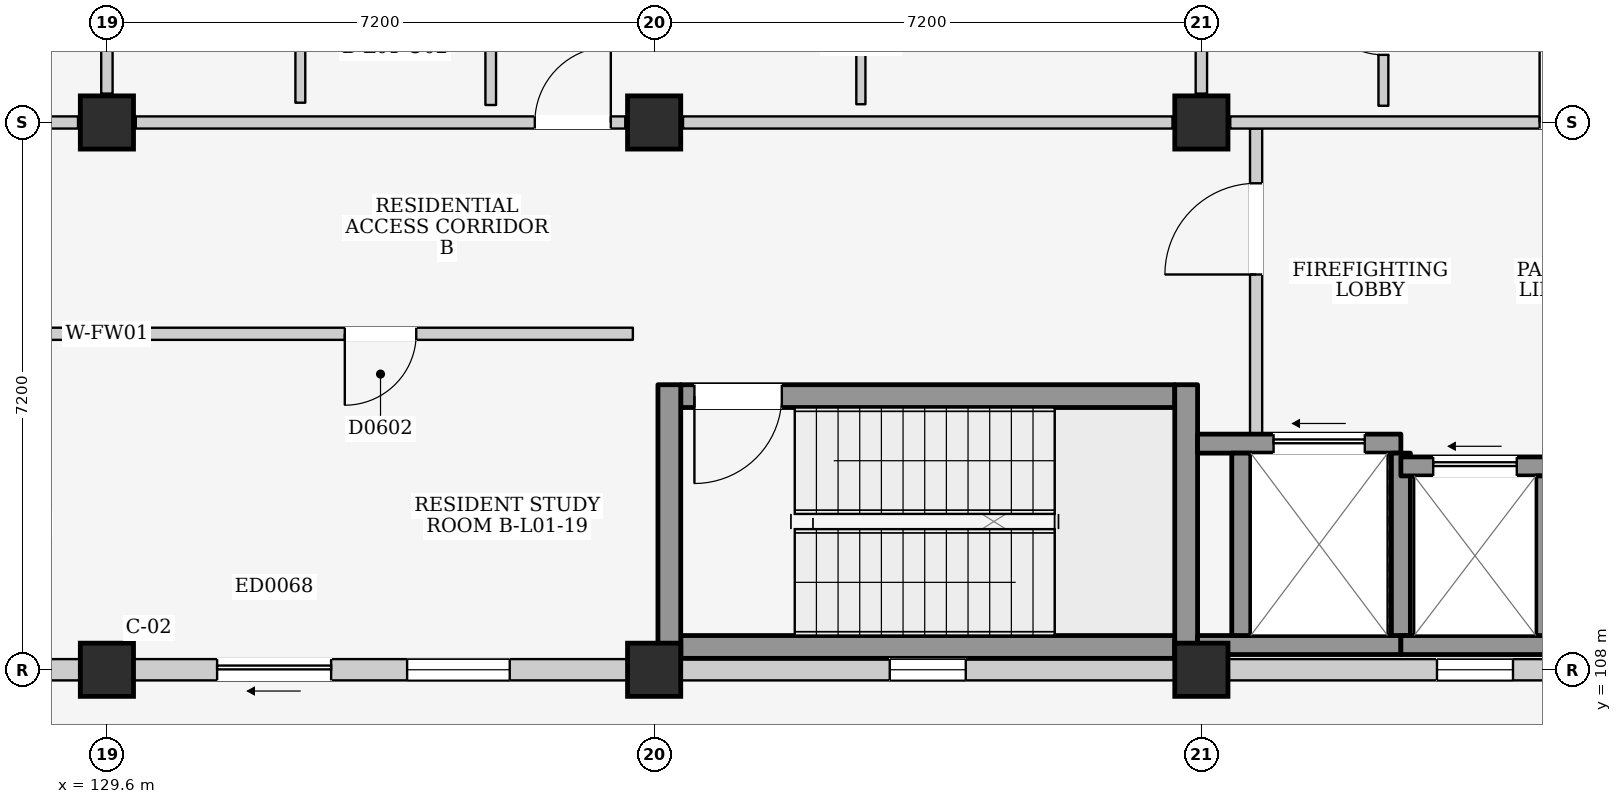
"""IFC4 building model, lengths in metres.
Left out: names, types, materials, properties, quantities, classifications, styles, units other than length and angle.
Written with IfcOpenShell. Run it as: python <this file> out.ifc"""

import sys

from ifc_helpers import new_model, si_unit, direction, frame, frame_2d, origin, origin_2d, place, context, subcontext, project, spatial, rectangle, extrude, element, fill, save


model = new_model("IFC4")
c1 = context("Model", 3, precision=1e-05, world=origin(), true_north=direction((0.0, 1.0)))
c2 = subcontext(c1, "Body", "Model", "MODEL_VIEW")
j1 = project(units=[si_unit("LENGTHUNIT", "METRE"), si_unit("PLANEANGLEUNIT", "RADIAN")], contexts=[c1])
p1 = place(None, origin())
s1 = spatial("IfcSite", under=j1, at=p1, CompositionType="ELEMENT")
p2 = place(p1, origin())
s2 = spatial("IfcBuilding", under=s1, at=p2, CompositionType="ELEMENT")
p3 = place(p2, frame((0.0, 0.0, 4.5)))
s3 = spatial("IfcBuildingStorey", under=s2, at=p3, CompositionType="ELEMENT", Elevation=4.5)
for number, where, z_axis, x_axis in (
    (1, (129.6, 108.0, 0.0), (0.0, 0.0, 1.0), (1.0, 0.0, 0.0)),
    (2, (129.6, 115.2, 0.0), (0.0, 0.0, 1.0), (1.0, 0.0, 0.0)),
    (3, (136.8, 108.0, 0.0), (0.0, 0.0, 1.0), (1.0, 0.0, 0.0)),
    (4, (136.8, 115.2, 0.0), (0.0, 0.0, 1.0), (1.0, 0.0, 0.0)),
    (5, (144.0, 108.0, 0.0), (0.0, 0.0, 1.0), (1.0, 0.0, 0.0)),
    (6, (144.0, 115.2, 0.0), (0.0, 0.0, 1.0), (1.0, 0.0, 0.0)),
):
    element("IfcColumn", number, at=place(p3, frame(where, z_axis=z_axis, x_axis=x_axis)), inside=s3, PredefinedType="COLUMN", context=c2, shape_type="SweptSolid", body=[
        extrude(rectangle(XDim=0.7, YDim=0.7, at=origin_2d()), origin(), (0.0, 0.0, 1.0), 4.5),
    ])
p4 = place(p3, frame((122.75, 108.0, 0.0), z_axis=(0.0, 0.0, 1.0), x_axis=(1.0, 0.0, 0.0)))
e7 = element("IfcWall", 7, at=p4, inside=s3, PredefinedType="ELEMENTEDWALL", context=c2, shape_type="SweptSolid", body=[
    extrude(rectangle(XDim=6.5, YDim=0.28, at=frame_2d((3.25, 0.0))), origin(), (0.0, 0.0, 1.0), 3.635),
])
p5 = place(p4, frame((1.1, 0.0, 0.0)))
e8 = element("IfcOpeningElement", 8, at=p5, cuts=e7, PredefinedType="OPENING", context=c2, shape_type="SweptSolid", body=[
    extrude(rectangle(XDim=1.5, YDim=2.12, at=frame_2d((0.75, 1.06))), frame((0.0, 0.155, 0.0), z_axis=(0.0, -1.0, 0.0), x_axis=(1.0, 0.0, 0.0)), (0.0, 0.0, 1.0), 0.31),
])
p6 = place(p4, frame((3.6, 0.0, 0.95)))
e9 = element("IfcOpeningElement", 9, at=p6, cuts=e7, PredefinedType="OPENING", context=c2, shape_type="SweptSolid", body=[
    extrude(rectangle(XDim=1.35, YDim=1.5, at=frame_2d((0.675, 0.75))), frame((0.0, 0.155, 0.0), z_axis=(0.0, -1.0, 0.0), x_axis=(1.0, 0.0, 0.0)), (0.0, 0.0, 1.0), 0.31),
])
p7 = place(p3, frame((129.95, 108.0, 0.0), z_axis=(0.0, 0.0, 1.0), x_axis=(1.0, 0.0, 0.0)))
e10 = element("IfcWall", 10, at=p7, inside=s3, PredefinedType="ELEMENTEDWALL", context=c2, shape_type="SweptSolid", body=[
    extrude(rectangle(XDim=6.5, YDim=0.28, at=frame_2d((3.25, 0.0))), origin(), (0.0, 0.0, 1.0), 3.635),
])
p8 = place(p7, frame((1.1, 0.0, 0.0)))
e11 = element("IfcOpeningElement", 11, at=p8, cuts=e10, PredefinedType="OPENING", context=c2, shape_type="SweptSolid", body=[
    extrude(rectangle(XDim=1.5, YDim=2.12, at=frame_2d((0.75, 1.06))), frame((0.0, 0.155, 0.0), z_axis=(0.0, -1.0, 0.0), x_axis=(1.0, 0.0, 0.0)), (0.0, 0.0, 1.0), 0.31),
])
p9 = place(p7, frame((3.6, 0.0, 0.95)))
e12 = element("IfcOpeningElement", 12, at=p9, cuts=e10, PredefinedType="OPENING", context=c2, shape_type="SweptSolid", body=[
    extrude(rectangle(XDim=1.35, YDim=1.5, at=frame_2d((0.675, 0.75))), frame((0.0, 0.155, 0.0), z_axis=(0.0, -1.0, 0.0), x_axis=(1.0, 0.0, 0.0)), (0.0, 0.0, 1.0), 0.31),
])
p10 = place(p3, frame((137.15, 108.0, 0.0), z_axis=(0.0, 0.0, 1.0), x_axis=(1.0, 0.0, 0.0)))
e13 = element("IfcWall", 13, at=p10, inside=s3, PredefinedType="ELEMENTEDWALL", context=c2, shape_type="SweptSolid", body=[
    extrude(rectangle(XDim=6.5, YDim=0.28, at=frame_2d((3.25, 0.0))), origin(), (0.0, 0.0, 1.0), 3.635),
])
p11 = place(p10, frame((2.75, 0.0, 1.2)))
e14 = element("IfcOpeningElement", 14, at=p11, cuts=e13, PredefinedType="OPENING", context=c2, shape_type="SweptSolid", body=[
    extrude(rectangle(XDim=1.0, YDim=0.9, at=frame_2d((0.5, 0.45))), frame((0.0, 0.155, 0.0), z_axis=(0.0, -1.0, 0.0), x_axis=(1.0, 0.0, 0.0)), (0.0, 0.0, 1.0), 0.31),
])
p12 = place(p3, frame((144.35, 108.0, 0.0), z_axis=(0.0, 0.0, 1.0), x_axis=(1.0, 0.0, 0.0)))
e15 = element("IfcWall", 15, at=p12, inside=s3, PredefinedType="ELEMENTEDWALL", context=c2, shape_type="SweptSolid", body=[
    extrude(rectangle(XDim=6.5, YDim=0.28, at=frame_2d((3.25, 0.0))), origin(), (0.0, 0.0, 1.0), 3.635),
])
p13 = place(p12, frame((2.75, 0.0, 1.2)))
e16 = element("IfcOpeningElement", 16, at=p13, cuts=e15, PredefinedType="OPENING", context=c2, shape_type="SweptSolid", body=[
    extrude(rectangle(XDim=1.0, YDim=0.9, at=frame_2d((0.5, 0.45))), frame((0.0, 0.155, 0.0), z_axis=(0.0, -1.0, 0.0), x_axis=(1.0, 0.0, 0.0)), (0.0, 0.0, 1.0), 0.31),
])
p14 = place(p3, frame((137.15, 108.3, 0.0), z_axis=(0.0, 0.0, 1.0), x_axis=(1.0, 0.0, 0.0)))
e17 = element("IfcWall", 17, at=p14, inside=s3, PredefinedType="SHEAR", context=c2, shape_type="SweptSolid", body=[
    extrude(rectangle(XDim=6.5, YDim=0.3, at=frame_2d((3.25, 0.0))), origin(), (0.0, 0.0, 1.0), 4.25),
])
p15 = place(p3, frame((137.15, 111.6, 0.0), z_axis=(0.0, 0.0, 1.0), x_axis=(1.0, 0.0, 0.0)))
e18 = element("IfcWall", 18, at=p15, inside=s3, PredefinedType="SHEAR", context=c2, shape_type="SweptSolid", body=[
    extrude(rectangle(XDim=6.5, YDim=0.3, at=frame_2d((3.25, 0.0))), origin(), (0.0, 0.0, 1.0), 4.25),
])
p16 = place(p15, frame((0.18, 0.0, 0.0)))
e19 = element("IfcOpeningElement", 19, at=p16, cuts=e18, PredefinedType="OPENING", context=c2, shape_type="SweptSolid", body=[
    extrude(rectangle(XDim=1.15, YDim=2.2, at=frame_2d((0.575, 1.1))), frame((0.0, 0.165, 0.0), z_axis=(0.0, -1.0, 0.0), x_axis=(1.0, 0.0, 0.0)), (0.0, 0.0, 1.0), 0.33),
])
for number, where, z_axis, x_axis in (
    (20, (137.0, 108.15, 0.0), (0.0, 0.0, 1.0), (0.0, 1.0, 0.0)),
    (21, (143.8, 108.15, 0.0), (0.0, 0.0, 1.0), (0.0, 1.0, 0.0)),
):
    element("IfcWall", number, at=place(p3, frame(where, z_axis=z_axis, x_axis=x_axis)), inside=s3, PredefinedType="SHEAR", context=c2, shape_type="SweptSolid", body=[
        extrude(rectangle(XDim=3.6, YDim=0.3, at=frame_2d((1.8, 0.0))), origin(), (0.0, 0.0, 1.0), 4.25),
    ])
p17 = place(p3, frame((144.72, 111.1, 0.0), z_axis=(0.0, 0.0, 1.0), x_axis=(0.0, 1.0, 0.0)))
e22 = element("IfcWall", 22, at=p17, inside=s3, PredefinedType="PARTITIONING", context=c2, shape_type="SweptSolid", body=[
    extrude(rectangle(XDim=4.02, YDim=0.16, at=frame_2d((2.01, 0.0))), origin(), (0.0, 0.0, 1.0), 4.25),
])
p18 = place(p17, frame((2.1, 0.0, 0.0)))
e23 = element("IfcOpeningElement", 23, at=p18, cuts=e22, PredefinedType="OPENING", context=c2, shape_type="SweptSolid", body=[
    extrude(rectangle(XDim=1.2, YDim=2.2, at=frame_2d((0.6, 1.1))), frame((0.0, 0.095, 0.0), z_axis=(0.0, -1.0, 0.0), x_axis=(1.0, 0.0, 0.0)), (0.0, 0.0, 1.0), 0.19),
])
p19 = place(p3, frame((143.95, 108.325, 0.0), z_axis=(0.0, 0.0, 1.0), x_axis=(1.0, 0.0, 0.0)))
e24 = element("IfcWall", 24, at=p19, inside=s3, PredefinedType="SHEAR", context=c2, shape_type="SweptSolid", body=[
    extrude(rectangle(XDim=2.675, YDim=0.25, at=frame_2d((1.337, 0.0))), origin(), (0.0, 0.0, 1.0), 4.25),
])
p20 = place(p3, frame((143.95, 110.975, 0.0), z_axis=(0.0, 0.0, 1.0), x_axis=(1.0, 0.0, 0.0)))
e25 = element("IfcWall", 25, at=p20, inside=s3, PredefinedType="SHEAR", context=c2, shape_type="SweptSolid", body=[
    extrude(rectangle(XDim=2.675, YDim=0.25, at=frame_2d((1.337, 0.0))), origin(), (0.0, 0.0, 1.0), 4.25),
])
p21 = place(p20, frame((1.0, 0.0, 0.0)))
e26 = element("IfcOpeningElement", 26, at=p21, cuts=e25, PredefinedType="OPENING", context=c2, shape_type="SweptSolid", body=[
    extrude(rectangle(XDim=1.2, YDim=2.25, at=frame_2d((0.6, 1.125))), frame((0.0, 0.14, 0.0), z_axis=(0.0, -1.0, 0.0), x_axis=(1.0, 0.0, 0.0)), (0.0, 0.0, 1.0), 0.28),
])
for number, where, z_axis, x_axis in (
    (27, (144.525, 108.45, 0.0), (0.0, 0.0, 1.0), (0.0, 1.0, 0.0)),
    (28, (146.625, 108.45, 0.0), (0.0, 0.0, 1.0), (0.0, 1.0, 0.0)),
):
    element("IfcWall", number, at=place(p3, frame(where, z_axis=z_axis, x_axis=x_axis)), inside=s3, PredefinedType="SHEAR", context=c2, shape_type="SweptSolid", body=[
        extrude(rectangle(XDim=2.4, YDim=0.25, at=frame_2d((1.2, 0.0))), origin(), (0.0, 0.0, 1.0), 4.25),
    ])
p22 = place(p3, frame((146.625, 108.325, 0.0), z_axis=(0.0, 0.0, 1.0), x_axis=(1.0, 0.0, 0.0)))
e29 = element("IfcWall", 29, at=p22, inside=s3, PredefinedType="SHEAR", context=c2, shape_type="SweptSolid", body=[
    extrude(rectangle(XDim=2.025, YDim=0.25, at=frame_2d((1.012, 0.0))), origin(), (0.0, 0.0, 1.0), 4.25),
])
p23 = place(p3, frame((146.625, 110.675, 0.0), z_axis=(0.0, 0.0, 1.0), x_axis=(1.0, 0.0, 0.0)))
e30 = element("IfcWall", 30, at=p23, inside=s3, PredefinedType="SHEAR", context=c2, shape_type="SweptSolid", body=[
    extrude(rectangle(XDim=2.025, YDim=0.25, at=frame_2d((1.012, 0.0))), origin(), (0.0, 0.0, 1.0), 4.25),
])
p24 = place(p23, frame((0.425, 0.0, 0.0)))
e31 = element("IfcOpeningElement", 31, at=p24, cuts=e30, PredefinedType="OPENING", context=c2, shape_type="SweptSolid", body=[
    extrude(rectangle(XDim=1.1, YDim=2.15, at=frame_2d((0.55, 1.075))), frame((0.0, 0.14, 0.0), z_axis=(0.0, -1.0, 0.0), x_axis=(1.0, 0.0, 0.0)), (0.0, 0.0, 1.0), 0.28),
])
p25 = place(p3, frame((148.525, 108.45, 0.0), z_axis=(0.0, 0.0, 1.0), x_axis=(0.0, 1.0, 0.0)))
e32 = element("IfcWall", 32, at=p25, inside=s3, PredefinedType="SHEAR", context=c2, shape_type="SweptSolid", body=[
    extrude(rectangle(XDim=2.1, YDim=0.25, at=frame_2d((1.05, 0.0))), origin(), (0.0, 0.0, 1.0), 4.25),
])
p26 = place(p3, frame((122.78, 115.2, 0.0), z_axis=(0.0, 0.0, 1.0), x_axis=(1.0, 0.0, 0.0)))
e33 = element("IfcWall", 33, at=p26, inside=s3, PredefinedType="PARTITIONING", context=c2, shape_type="SweptSolid", body=[
    extrude(rectangle(XDim=6.44, YDim=0.16, at=frame_2d((3.22, 0.0))), origin(), (0.0, 0.0, 1.0), 3.635),
])
p27 = place(p26, frame((4.045, 0.0, 0.0)))
e34 = element("IfcOpeningElement", 34, at=p27, cuts=e33, PredefinedType="OPENING", context=c2, shape_type="SweptSolid", body=[
    extrude(rectangle(XDim=1.05, YDim=2.2, at=frame_2d((0.525, 1.1))), frame((0.0, 0.095, 0.0), z_axis=(0.0, -1.0, 0.0), x_axis=(1.0, 0.0, 0.0)), (0.0, 0.0, 1.0), 0.19),
])
p28 = place(p3, frame((129.6, 115.58, 0.0), z_axis=(0.0, 0.0, 1.0), x_axis=(0.0, 1.0, 0.0)))
e35 = element("IfcWall", 35, at=p28, inside=s3, PredefinedType="PARTITIONING", context=c2, shape_type="SweptSolid", body=[
    extrude(rectangle(XDim=6.44, YDim=0.15, at=frame_2d((3.22, 0.0))), origin(), (0.0, 0.0, 1.0), 3.685),
])
p29 = place(p3, frame((129.98, 115.2, 0.0), z_axis=(0.0, 0.0, 1.0), x_axis=(1.0, 0.0, 0.0)))
e36 = element("IfcWall", 36, at=p29, inside=s3, PredefinedType="PARTITIONING", context=c2, shape_type="SweptSolid", body=[
    extrude(rectangle(XDim=6.44, YDim=0.16, at=frame_2d((3.22, 0.0))), origin(), (0.0, 0.0, 1.0), 3.635),
])
p30 = place(p29, frame((5.25, 0.0, 0.0)))
e37 = element("IfcOpeningElement", 37, at=p30, cuts=e36, PredefinedType="OPENING", context=c2, shape_type="SweptSolid", body=[
    extrude(rectangle(XDim=1.0, YDim=2.15, at=frame_2d((0.5, 1.075))), frame((0.0, 0.095, 0.0), z_axis=(0.0, -1.0, 0.0), x_axis=(1.0, 0.0, 0.0)), (0.0, 0.0, 1.0), 0.19),
])
p31 = place(p3, frame((137.18, 115.2, 0.0), z_axis=(0.0, 0.0, 1.0), x_axis=(1.0, 0.0, 0.0)))
e38 = element("IfcWall", 38, at=p31, inside=s3, PredefinedType="PARTITIONING", context=c2, shape_type="SweptSolid", body=[
    extrude(rectangle(XDim=6.44, YDim=0.16, at=frame_2d((3.22, 0.0))), origin(), (0.0, 0.0, 1.0), 3.635),
])
p32 = place(p3, frame((144.0, 115.58, 0.0), z_axis=(0.0, 0.0, 1.0), x_axis=(0.0, 1.0, 0.0)))
e39 = element("IfcWall", 39, at=p32, inside=s3, PredefinedType="PARTITIONING", context=c2, shape_type="SweptSolid", body=[
    extrude(rectangle(XDim=6.44, YDim=0.15, at=frame_2d((3.22, 0.0))), origin(), (0.0, 0.0, 1.0), 3.685),
])
p33 = place(p3, frame((132.145, 115.46, 0.0), z_axis=(0.0, 0.0, 1.0), x_axis=(0.0, 1.0, 0.0)))
e40 = element("IfcWall", 40, at=p33, inside=s3, PredefinedType="PARTITIONING", context=c2, shape_type="SweptSolid", body=[
    extrude(rectangle(XDim=3.04, YDim=0.13, at=frame_2d((1.52, 0.0))), origin(), (0.0, 0.0, 1.0), 4.25),
])
p34 = place(p3, frame((134.65, 115.43, 0.0), z_axis=(0.0, 0.0, 1.0), x_axis=(0.0, 1.0, 0.0)))
e41 = element("IfcWall", 41, at=p34, inside=s3, PredefinedType="PARTITIONING", context=c2, shape_type="SweptSolid", body=[
    extrude(rectangle(XDim=3.06, YDim=0.14, at=frame_2d((1.53, 0.0))), origin(), (0.0, 0.0, 1.0), 4.25),
])
p35 = place(p3, frame((139.52, 115.44, 0.0), z_axis=(0.0, 0.0, 1.0), x_axis=(0.0, 1.0, 0.0)))
e42 = element("IfcWall", 42, at=p35, inside=s3, PredefinedType="PARTITIONING", context=c2, shape_type="SweptSolid", body=[
    extrude(rectangle(XDim=3.04, YDim=0.12, at=frame_2d((1.52, 0.0))), origin(), (0.0, 0.0, 1.0), 4.25),
])
p36 = place(p35, frame((1.04, 0.0, 0.0)))
e43 = element("IfcOpeningElement", 43, at=p36, cuts=e42, PredefinedType="OPENING", context=c2, shape_type="SweptSolid", body=[
    extrude(rectangle(XDim=0.96, YDim=2.15, at=frame_2d((0.48, 1.075))), frame((0.0, 0.075, 0.0), z_axis=(0.0, -1.0, 0.0), x_axis=(1.0, 0.0, 0.0)), (0.0, 0.0, 1.0), 0.15),
])
p37 = place(p3, frame((144.38, 115.2, 0.0), z_axis=(0.0, 0.0, 1.0), x_axis=(1.0, 0.0, 0.0)))
e44 = element("IfcWall", 44, at=p37, inside=s3, PredefinedType="PARTITIONING", context=c2, shape_type="SweptSolid", body=[
    extrude(rectangle(XDim=6.44, YDim=0.16, at=frame_2d((3.22, 0.0))), origin(), (0.0, 0.0, 1.0), 3.635),
])
p38 = place(p37, frame((4.07, 0.0, 0.0)))
e45 = element("IfcOpeningElement", 45, at=p38, cuts=e44, PredefinedType="OPENING", context=c2, shape_type="SweptSolid", body=[
    extrude(rectangle(XDim=1.0, YDim=2.15, at=frame_2d((0.5, 1.075))), frame((0.0, 0.095, 0.0), z_axis=(0.0, -1.0, 0.0), x_axis=(1.0, 0.0, 0.0)), (0.0, 0.0, 1.0), 0.19),
])
p39 = place(p3, frame((146.395, 115.42, 0.0), z_axis=(0.0, 0.0, 1.0), x_axis=(0.0, 1.0, 0.0)))
e46 = element("IfcWall", 46, at=p39, inside=s3, PredefinedType="PARTITIONING", context=c2, shape_type="SweptSolid", body=[
    extrude(rectangle(XDim=2.22, YDim=0.13, at=frame_2d((1.11, 0.0))), origin(), (0.0, 0.0, 1.0), 4.25),
])
p40 = place(p39, frame((0.67, 0.0, 0.0)))
e47 = element("IfcOpeningElement", 47, at=p40, cuts=e46, PredefinedType="OPENING", context=c2, shape_type="SweptSolid", body=[
    extrude(rectangle(XDim=0.88, YDim=2.1, at=frame_2d((0.44, 1.05))), frame((0.0, 0.08, 0.0), z_axis=(0.0, -1.0, 0.0), x_axis=(1.0, 0.0, 0.0)), (0.0, 0.0, 1.0), 0.16),
])
p41 = place(p3, frame((122.68, 112.42, 0.0), z_axis=(0.0, 0.0, 1.0), x_axis=(1.0, 0.0, 0.0)))
e48 = element("IfcWall", 48, at=p41, inside=s3, PredefinedType="PARTITIONING", context=c2, shape_type="SweptSolid", body=[
    extrude(rectangle(XDim=6.64, YDim=0.16, at=frame_2d((3.32, 0.0))), origin(), (0.0, 0.0, 1.0), 4.25),
])
p42 = place(p41, frame((2.85, 0.0, 0.0)))
e49 = element("IfcOpeningElement", 49, at=p42, cuts=e48, PredefinedType="OPENING", context=c2, shape_type="SweptSolid", body=[
    extrude(rectangle(XDim=0.94, YDim=2.12, at=frame_2d((0.47, 1.06))), frame((0.0, 0.095, 0.0), z_axis=(0.0, -1.0, 0.0), x_axis=(1.0, 0.0, 0.0)), (0.0, 0.0, 1.0), 0.19),
])
p43 = place(p3, frame((129.88, 112.42, 0.0), z_axis=(0.0, 0.0, 1.0), x_axis=(1.0, 0.0, 0.0)))
e50 = element("IfcWall", 50, at=p43, inside=s3, PredefinedType="PARTITIONING", context=c2, shape_type="SweptSolid", body=[
    extrude(rectangle(XDim=6.64, YDim=0.16, at=frame_2d((3.32, 0.0))), origin(), (0.0, 0.0, 1.0), 4.25),
])
p44 = place(p43, frame((2.85, 0.0, 0.0)))
e51 = element("IfcOpeningElement", 51, at=p44, cuts=e50, PredefinedType="OPENING", context=c2, shape_type="SweptSolid", body=[
    extrude(rectangle(XDim=0.94, YDim=2.12, at=frame_2d((0.47, 1.06))), frame((0.0, 0.095, 0.0), z_axis=(0.0, -1.0, 0.0), x_axis=(1.0, 0.0, 0.0)), (0.0, 0.0, 1.0), 0.19),
])
p45 = place(p8, frame((1.5, 0.0, 0.0), z_axis=(0.0, 0.0, 1.0), x_axis=(-1.0, 0.0, 0.0)))
e52 = element("IfcDoor", 52, at=p45, inside=s3, OperationType="SLIDING_TO_LEFT", PredefinedType="DOOR", context=c2, shape_type="SweptSolid", body=[
    extrude(rectangle(XDim=1.5, YDim=2.12, at=frame_2d((0.75, 1.06))), frame((0.0, 0.025, 0.0), z_axis=(0.0, -1.0, 0.0), x_axis=(1.0, 0.0, 0.0)), (0.0, 0.0, 1.0), 0.05),
])
fill(e11, e52)
p46 = place(p9, origin())
e53 = element("IfcWindow", 53, at=p46, inside=s3, PartitioningType="SINGLE_PANEL", PredefinedType="WINDOW", context=c2, shape_type="SweptSolid", body=[
    extrude(rectangle(XDim=1.35, YDim=1.5, at=frame_2d((0.675, 0.75))), frame((0.0, 0.03, 0.0), z_axis=(0.0, -1.0, 0.0), x_axis=(1.0, 0.0, 0.0)), (0.0, 0.0, 1.0), 0.06),
])
fill(e12, e53)
p47 = place(p11, origin())
e54 = element("IfcWindow", 54, at=p47, inside=s3, PartitioningType="SINGLE_PANEL", PredefinedType="WINDOW", context=c2, shape_type="SweptSolid", body=[
    extrude(rectangle(XDim=1.0, YDim=0.9, at=frame_2d((0.5, 0.45))), frame((0.0, 0.03, 0.0), z_axis=(0.0, -1.0, 0.0), x_axis=(1.0, 0.0, 0.0)), (0.0, 0.0, 1.0), 0.06),
])
fill(e14, e54)
p48 = place(p13, origin())
e55 = element("IfcWindow", 55, at=p48, inside=s3, PartitioningType="SINGLE_PANEL", PredefinedType="WINDOW", context=c2, shape_type="SweptSolid", body=[
    extrude(rectangle(XDim=1.0, YDim=0.9, at=frame_2d((0.5, 0.45))), frame((0.0, 0.03, 0.0), z_axis=(0.0, -1.0, 0.0), x_axis=(1.0, 0.0, 0.0)), (0.0, 0.0, 1.0), 0.06),
])
fill(e16, e55)
p49 = place(p16, frame((1.15, 0.0, 0.0), z_axis=(0.0, 0.0, 1.0), x_axis=(-1.0, 0.0, 0.0)))
e56 = element("IfcDoor", 56, at=p49, inside=s3, OperationType="SINGLE_SWING_RIGHT", PredefinedType="DOOR", context=c2, shape_type="SweptSolid", body=[
    extrude(rectangle(XDim=1.15, YDim=2.2, at=frame_2d((0.575, 1.1))), frame((0.0, 0.025, 0.0), z_axis=(0.0, -1.0, 0.0), x_axis=(1.0, 0.0, 0.0)), (0.0, 0.0, 1.0), 0.05),
])
fill(e19, e56)
p50 = place(p18, origin())
e57 = element("IfcDoor", 57, at=p50, inside=s3, OperationType="SINGLE_SWING_LEFT", PredefinedType="DOOR", context=c2, shape_type="SweptSolid", body=[
    extrude(rectangle(XDim=1.2, YDim=2.2, at=frame_2d((0.6, 1.1))), frame((0.0, 0.025, 0.0), z_axis=(0.0, -1.0, 0.0), x_axis=(1.0, 0.0, 0.0)), (0.0, 0.0, 1.0), 0.05),
])
fill(e23, e57)
p51 = place(p21, origin())
e58 = element("IfcDoor", 58, at=p51, inside=s3, OperationType="SLIDING_TO_LEFT", PredefinedType="DOOR", context=c2, shape_type="SweptSolid", body=[
    extrude(rectangle(XDim=1.2, YDim=2.25, at=frame_2d((0.6, 1.125))), frame((0.0, 0.025, 0.0), z_axis=(0.0, -1.0, 0.0), x_axis=(1.0, 0.0, 0.0)), (0.0, 0.0, 1.0), 0.05),
])
fill(e26, e58)
p52 = place(p24, origin())
e59 = element("IfcDoor", 59, at=p52, inside=s3, OperationType="SLIDING_TO_LEFT", PredefinedType="DOOR", context=c2, shape_type="SweptSolid", body=[
    extrude(rectangle(XDim=1.1, YDim=2.15, at=frame_2d((0.55, 1.075))), frame((0.0, 0.025, 0.0), z_axis=(0.0, -1.0, 0.0), x_axis=(1.0, 0.0, 0.0)), (0.0, 0.0, 1.0), 0.05),
])
fill(e31, e59)
p53 = place(p30, origin())
e60 = element("IfcDoor", 60, at=p53, inside=s3, OperationType="SINGLE_SWING_RIGHT", PredefinedType="DOOR", context=c2, shape_type="SweptSolid", body=[
    extrude(rectangle(XDim=1.0, YDim=2.15, at=frame_2d((0.5, 1.075))), frame((0.0, 0.025, 0.0), z_axis=(0.0, -1.0, 0.0), x_axis=(1.0, 0.0, 0.0)), (0.0, 0.0, 1.0), 0.05),
])
fill(e37, e60)
p54 = place(p38, origin())
e61 = element("IfcDoor", 61, at=p54, inside=s3, OperationType="SINGLE_SWING_LEFT", PredefinedType="DOOR", context=c2, shape_type="SweptSolid", body=[
    extrude(rectangle(XDim=1.0, YDim=2.15, at=frame_2d((0.5, 1.075))), frame((0.0, 0.025, 0.0), z_axis=(0.0, -1.0, 0.0), x_axis=(1.0, 0.0, 0.0)), (0.0, 0.0, 1.0), 0.05),
])
fill(e45, e61)
p55 = place(p40, origin())
e62 = element("IfcDoor", 62, at=p55, inside=s3, OperationType="SINGLE_SWING_RIGHT", PredefinedType="DOOR", context=c2, shape_type="SweptSolid", body=[
    extrude(rectangle(XDim=0.88, YDim=2.1, at=frame_2d((0.44, 1.05))), frame((0.0, 0.025, 0.0), z_axis=(0.0, -1.0, 0.0), x_axis=(1.0, 0.0, 0.0)), (0.0, 0.0, 1.0), 0.05),
])
fill(e47, e62)
p56 = place(p44, frame((0.94, 0.0, 0.0), z_axis=(0.0, 0.0, 1.0), x_axis=(-1.0, 0.0, 0.0)))
e63 = element("IfcDoor", 63, at=p56, inside=s3, OperationType="SINGLE_SWING_RIGHT", PredefinedType="DOOR", context=c2, shape_type="SweptSolid", body=[
    extrude(rectangle(XDim=0.94, YDim=2.12, at=frame_2d((0.47, 1.06))), frame((0.0, 0.025, 0.0), z_axis=(0.0, -1.0, 0.0), x_axis=(1.0, 0.0, 0.0)), (0.0, 0.0, 1.0), 0.05),
])
fill(e51, e63)
save(model, sys.argv[1])
